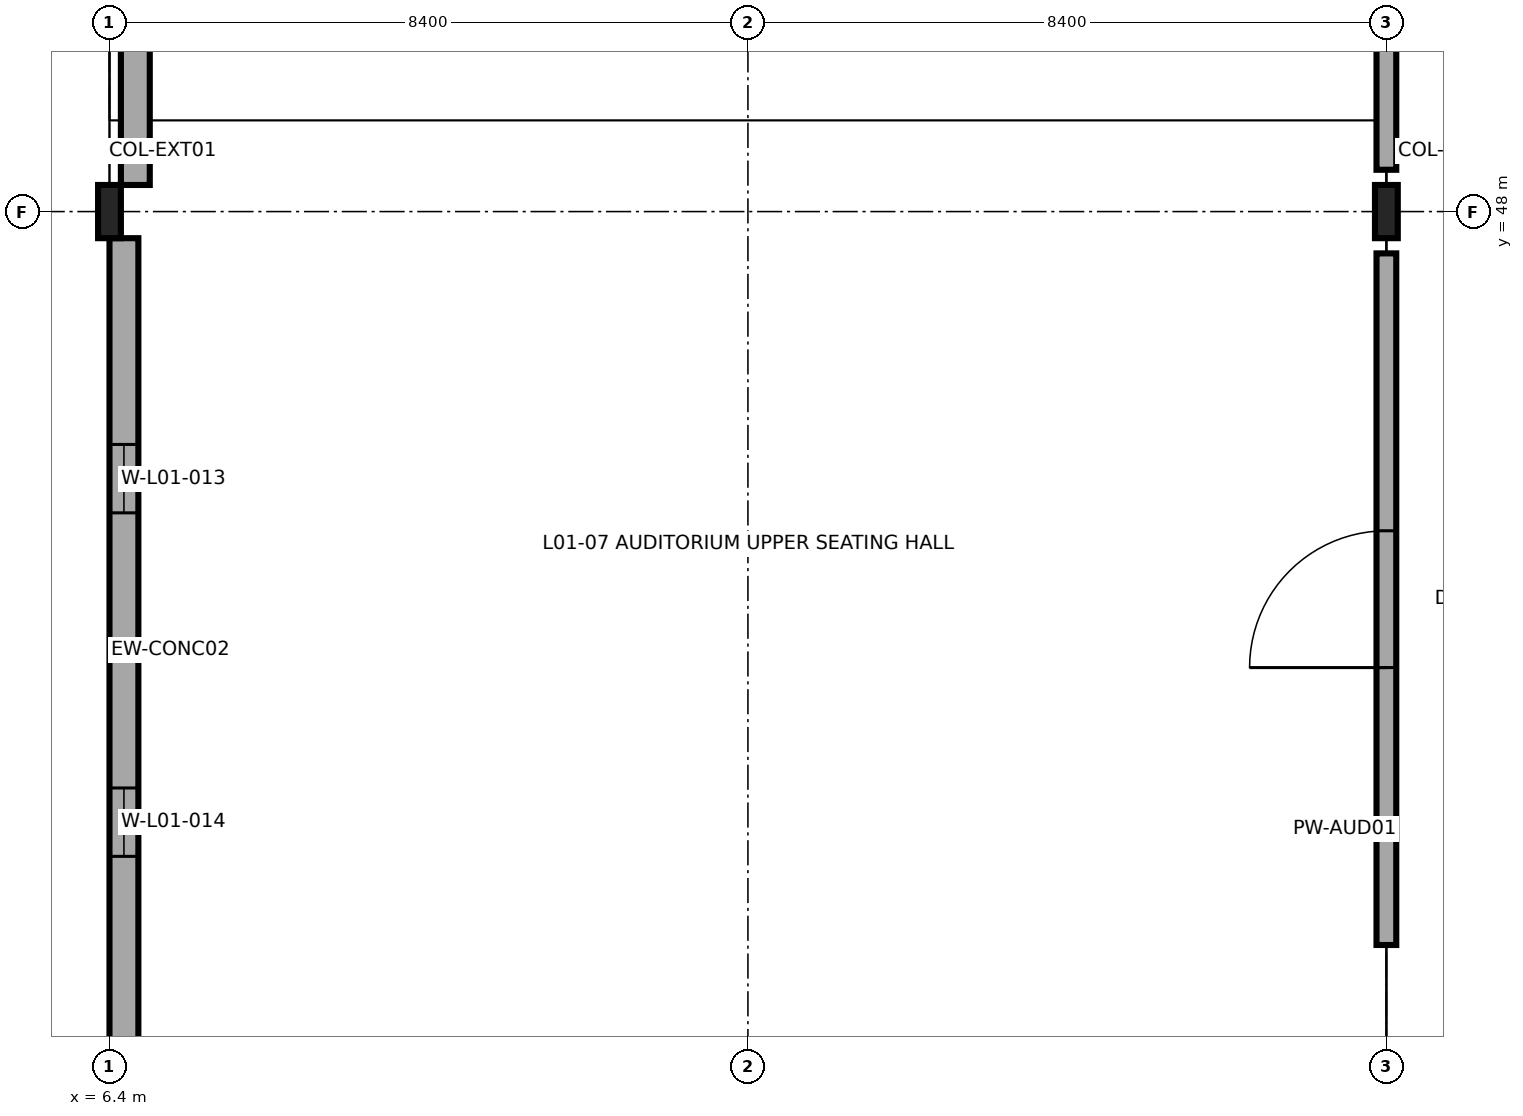
"""IFC4 building model, lengths in metres.
Left out: names, types, materials, properties, quantities, classifications, styles, units other than length and angle.
Written with IfcOpenShell. Run it as: python <this file> out.ifc"""

import sys

from ifc_helpers import new_model, si_unit, direction, frame, frame_2d, origin, origin_2d, place, context, subcontext, project, spatial, rectangle, i_section, extrude, element, fill, save


model = new_model("IFC4")
c1 = context("Model", 3, precision=1e-05, world=origin(), true_north=direction((0.0, 1.0)))
c2 = subcontext(c1, "Body", "Model", "MODEL_VIEW")
j1 = project(units=[si_unit("LENGTHUNIT", "METRE"), si_unit("PLANEANGLEUNIT", "RADIAN")], contexts=[c1])
p1 = place(None, origin())
s1 = spatial("IfcSite", under=j1, at=p1, CompositionType="ELEMENT")
p2 = place(p1, origin())
s2 = spatial("IfcBuilding", under=s1, at=p2, CompositionType="ELEMENT")
p3 = place(p2, frame((0.0, 0.0, 8.4)))
s3 = spatial("IfcBuildingStorey", under=s2, at=p3, CompositionType="ELEMENT", Elevation=8.4)
for number, where, z_axis, x_axis in (
    (1, (6.4, 48.0, 0.0), (0.0, 0.0, 1.0), (1.0, 0.0, 0.0)),
    (2, (23.2, 48.0, 0.0), (0.0, 0.0, 1.0), (1.0, 0.0, 0.0)),
):
    element("IfcColumn", number, at=place(p3, frame(where, z_axis=z_axis, x_axis=x_axis)), inside=s3, PredefinedType="COLUMN", context=c2, shape_type="SweptSolid", body=[
        extrude(i_section(OverallWidth=0.3, OverallDepth=0.7, WebThickness=0.017, FlangeThickness=0.032, FilletRadius=0.027, at=origin_2d()), origin(), (0.0, 0.0, 1.0), 4.75),
    ])
p4 = place(p3, frame((6.59, 47.65, 0.0), z_axis=(0.0, 0.0, 1.0), x_axis=(0.0, -1.0, 0.0)))
e3 = element("IfcWall", 3, at=p4, inside=s3, PredefinedType="SOLIDWALL", context=c2, shape_type="SweptSolid", body=[
    extrude(rectangle(XDim=11.3, YDim=0.38, at=frame_2d((5.65, 0.0))), origin(), (0.0, 0.0, 1.0), 3.85),
])
p5 = place(p4, frame((2.714, 0.0, 1.1)))
e4 = element("IfcOpeningElement", 4, at=p5, cuts=e3, PredefinedType="OPENING", context=c2, shape_type="SweptSolid", body=[
    extrude(rectangle(XDim=0.9, YDim=2.6, at=frame_2d((0.45, 1.3))), frame((0.0, 0.2, 0.0), z_axis=(0.0, -1.0, 0.0), x_axis=(1.0, 0.0, 0.0)), (0.0, 0.0, 1.0), 0.4),
])
p6 = place(p4, frame((7.234, 0.0, 1.1)))
e5 = element("IfcOpeningElement", 5, at=p6, cuts=e3, PredefinedType="OPENING", context=c2, shape_type="SweptSolid", body=[
    extrude(rectangle(XDim=0.9, YDim=2.6, at=frame_2d((0.45, 1.3))), frame((0.0, 0.2, 0.0), z_axis=(0.0, -1.0, 0.0), x_axis=(1.0, 0.0, 0.0)), (0.0, 0.0, 1.0), 0.4),
])
p7 = place(p3, frame((6.74, 59.65, 0.0), z_axis=(0.0, 0.0, 1.0), x_axis=(0.0, -1.0, 0.0)))
e6 = element("IfcWall", 6, at=p7, inside=s3, PredefinedType="SOLIDWALL", context=c2, shape_type="SweptSolid", body=[
    extrude(rectangle(XDim=11.3, YDim=0.38, at=frame_2d((5.65, 0.0))), origin(), (0.0, 0.0, 1.0), 3.88),
])
p8 = place(p3, frame((23.2, 48.55, 0.0), z_axis=(0.0, 0.0, 1.0), x_axis=(0.0, 1.0, 0.0)))
e7 = element("IfcWall", 7, at=p8, inside=s3, PredefinedType="PARTITIONING", context=c2, shape_type="SweptSolid", body=[
    extrude(rectangle(XDim=10.9, YDim=0.26, at=frame_2d((5.45, 0.0))), origin(), (0.0, 0.0, 1.0), 3.902),
])
p9 = place(p3, frame((23.2, 38.35, 0.0), z_axis=(0.0, 0.0, 1.0), x_axis=(0.0, 1.0, 0.0)))
e8 = element("IfcWall", 8, at=p9, inside=s3, PredefinedType="PARTITIONING", context=c2, shape_type="SweptSolid", body=[
    extrude(rectangle(XDim=9.1, YDim=0.26, at=frame_2d((4.55, 0.0))), origin(), (0.0, 0.0, 1.0), 3.902),
])
p10 = place(p9, frame((3.65, 0.0, 0.0)))
e9 = element("IfcOpeningElement", 9, at=p10, cuts=e8, PredefinedType="OPENING", context=c2, shape_type="SweptSolid", body=[
    extrude(rectangle(XDim=1.8, YDim=2.3, at=frame_2d((0.9, 1.15))), frame((0.0, 0.14, 0.0), z_axis=(0.0, -1.0, 0.0), x_axis=(1.0, 0.0, 0.0)), (0.0, 0.0, 1.0), 0.28),
])
p11 = place(p5, origin())
e10 = element("IfcWindow", 10, at=p11, inside=s3, PartitioningType="SINGLE_PANEL", PredefinedType="WINDOW", context=c2, shape_type="SweptSolid", body=[
    extrude(rectangle(XDim=0.9, YDim=2.6, at=frame_2d((0.45, 1.3))), frame((0.0, 0.03, 0.0), z_axis=(0.0, -1.0, 0.0), x_axis=(1.0, 0.0, 0.0)), (0.0, 0.0, 1.0), 0.06),
])
fill(e4, e10)
p12 = place(p6, origin())
e11 = element("IfcWindow", 11, at=p12, inside=s3, PartitioningType="SINGLE_PANEL", PredefinedType="WINDOW", context=c2, shape_type="SweptSolid", body=[
    extrude(rectangle(XDim=0.9, YDim=2.6, at=frame_2d((0.45, 1.3))), frame((0.0, 0.03, 0.0), z_axis=(0.0, -1.0, 0.0), x_axis=(1.0, 0.0, 0.0)), (0.0, 0.0, 1.0), 0.06),
])
fill(e5, e11)
p13 = place(p10, origin())
e12 = element("IfcDoor", 12, at=p13, inside=s3, OperationType="DOUBLE_DOOR_SINGLE_SWING", PredefinedType="DOOR", context=c2, shape_type="SweptSolid", body=[
    extrude(rectangle(XDim=1.8, YDim=2.3, at=frame_2d((0.9, 1.15))), frame((0.0, 0.025, 0.0), z_axis=(0.0, -1.0, 0.0), x_axis=(1.0, 0.0, 0.0)), (0.0, 0.0, 1.0), 0.05),
])
fill(e9, e12)
save(model, sys.argv[1])
